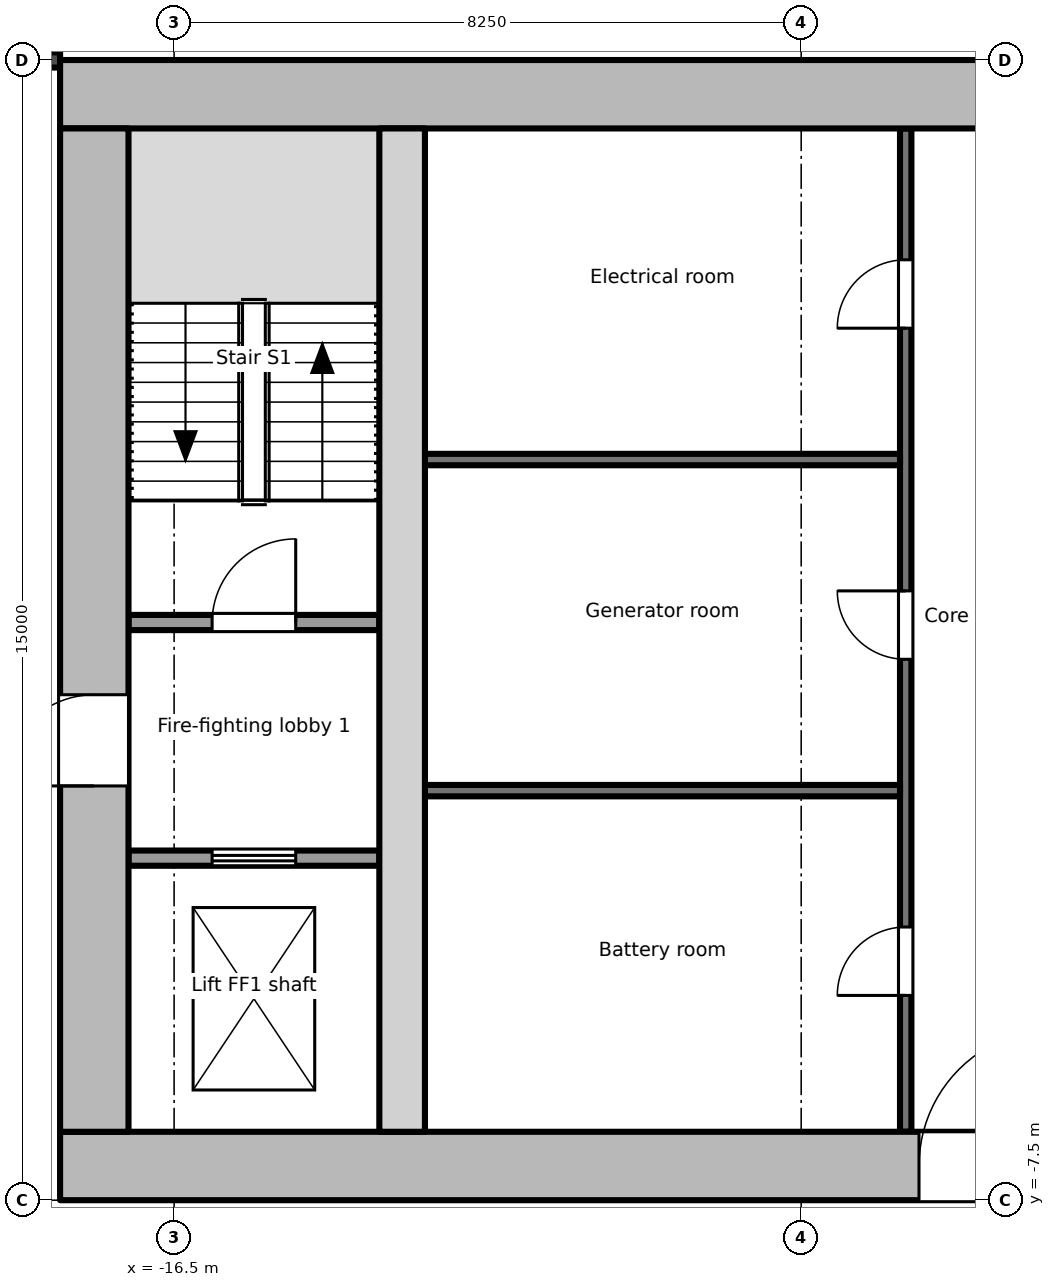
"""IFC4 building model, lengths in metres.
Left out: names, types, materials, properties, quantities, classifications, styles, units other than length and angle.
Written with IfcOpenShell. Run it as: python <this file> out.ifc"""

import sys

from ifc_helpers import new_model, si_unit, direction, frame, frame_2d, origin, place, context, subcontext, project, spatial, rectangle, extrude, element, fill, save


model = new_model("IFC4")
c1 = context("Model", 3, precision=1e-05, world=origin(), true_north=direction((0.0, 1.0)))
c2 = subcontext(c1, "Body", "Model", "MODEL_VIEW")
j1 = project(units=[si_unit("LENGTHUNIT", "METRE"), si_unit("PLANEANGLEUNIT", "RADIAN")], contexts=[c1])
p1 = place(None, origin())
s1 = spatial("IfcSite", under=j1, at=p1, CompositionType="ELEMENT")
p2 = place(p1, origin())
s2 = spatial("IfcBuilding", under=s1, at=p2, CompositionType="ELEMENT")
p3 = place(p2, frame((0.0, 0.0, 296.3)))
s3 = spatial("IfcBuildingStorey", under=s2, at=p3, CompositionType="ELEMENT", Elevation=296.3)
p4 = place(p3, frame((-18.0, -7.05, -0.2), z_axis=(0.0, 0.0, 1.0), x_axis=(1.0, 0.0, 0.0)))
e1 = element("IfcWall", 1, at=p4, inside=s3, PredefinedType="SHEAR", context=c2, shape_type="SweptSolid", body=[
    extrude(rectangle(XDim=36.0, YDim=0.9, at=frame_2d((18.0, 0.0))), origin(), (0.0, 0.0, 1.0), 4.0),
])
p5 = place(p4, frame((11.3, 0.0, 0.2)))
e2 = element("IfcOpeningElement", 2, at=p5, cuts=e1, PredefinedType="OPENING", context=c2, shape_type="SweptSolid", body=[
    extrude(rectangle(XDim=1.8, YDim=2.1, at=frame_2d((0.9, 1.05))), frame((0.0, 0.46, 0.0), z_axis=(0.0, -1.0, 0.0), x_axis=(1.0, 0.0, 0.0)), (0.0, 0.0, 1.0), 0.921),
])
p6 = place(p4, frame((20.3, 0.0, 0.2)))
e3 = element("IfcOpeningElement", 3, at=p6, cuts=e1, PredefinedType="OPENING", context=c2, shape_type="SweptSolid", body=[
    extrude(rectangle(XDim=1.8, YDim=2.1, at=frame_2d((0.9, 1.05))), frame((0.0, 0.46, 0.0), z_axis=(0.0, -1.0, 0.0), x_axis=(1.0, 0.0, 0.0)), (0.0, 0.0, 1.0), 0.921),
])
p7 = place(p4, frame((29.3, 0.0, 0.2)))
e4 = element("IfcOpeningElement", 4, at=p7, cuts=e1, PredefinedType="OPENING", context=c2, shape_type="SweptSolid", body=[
    extrude(rectangle(XDim=1.8, YDim=2.1, at=frame_2d((0.9, 1.05))), frame((0.0, 0.46, 0.0), z_axis=(0.0, -1.0, 0.0), x_axis=(1.0, 0.0, 0.0)), (0.0, 0.0, 1.0), 0.921),
])
p8 = place(p3, frame((-18.0, 7.05, -0.2), z_axis=(0.0, 0.0, 1.0), x_axis=(1.0, 0.0, 0.0)))
e5 = element("IfcWall", 5, at=p8, inside=s3, PredefinedType="SHEAR", context=c2, shape_type="SweptSolid", body=[
    extrude(rectangle(XDim=36.0, YDim=0.9, at=frame_2d((18.0, 0.0))), origin(), (0.0, 0.0, 1.0), 4.0),
])
p9 = place(p3, frame((-17.55, -6.6, -0.2), z_axis=(0.0, 0.0, 1.0), x_axis=(0.0, 1.0, 0.0)))
e6 = element("IfcWall", 6, at=p9, inside=s3, PredefinedType="SHEAR", context=c2, shape_type="SweptSolid", body=[
    extrude(rectangle(XDim=13.2, YDim=0.9, at=frame_2d((6.6, 0.0))), origin(), (0.0, 0.0, 1.0), 4.0),
])
p10 = place(p9, frame((4.55, 0.0, 0.2)))
e7 = element("IfcOpeningElement", 7, at=p10, cuts=e6, PredefinedType="OPENING", context=c2, shape_type="SweptSolid", body=[
    extrude(rectangle(XDim=1.2, YDim=2.1, at=frame_2d((0.6, 1.05))), frame((0.0, 0.46, 0.0), z_axis=(0.0, -1.0, 0.0), x_axis=(1.0, 0.0, 0.0)), (0.0, 0.0, 1.0), 0.921),
])
p11 = place(p3, frame((-13.5, -6.6, -0.2), z_axis=(0.0, 0.0, 1.0), x_axis=(0.0, 1.0, 0.0)))
e8 = element("IfcWall", 8, at=p11, inside=s3, PredefinedType="SHEAR", context=c2, shape_type="SweptSolid", body=[
    extrude(rectangle(XDim=13.2, YDim=0.6, at=frame_2d((6.6, 0.0))), origin(), (0.0, 0.0, 1.0), 4.0),
])
p12 = place(p3, frame((-17.1, -3.0, 0.0), z_axis=(0.0, 0.0, 1.0), x_axis=(1.0, 0.0, 0.0)))
e9 = element("IfcWall", 9, at=p12, inside=s3, PredefinedType="PARTITIONING", context=c2, shape_type="SweptSolid", body=[
    extrude(rectangle(XDim=3.3, YDim=0.2, at=frame_2d((1.65, 0.0))), origin(), (0.0, 0.0, 1.0), 3.8),
])
p13 = place(p12, frame((1.1, 0.0, 0.0)))
e10 = element("IfcOpeningElement", 10, at=p13, cuts=e9, PredefinedType="OPENING", context=c2, shape_type="SweptSolid", body=[
    extrude(rectangle(XDim=1.1, YDim=2.1, at=frame_2d((0.55, 1.05))), frame((0.0, 0.111, 0.0), z_axis=(0.0, -1.0, 0.0), x_axis=(1.0, 0.0, 0.0)), (0.0, 0.0, 1.0), 0.221),
])
p14 = place(p3, frame((-17.1, 0.1, 0.0), z_axis=(0.0, 0.0, 1.0), x_axis=(1.0, 0.0, 0.0)))
e11 = element("IfcWall", 11, at=p14, inside=s3, PredefinedType="PARTITIONING", context=c2, shape_type="SweptSolid", body=[
    extrude(rectangle(XDim=3.3, YDim=0.2, at=frame_2d((1.65, 0.0))), origin(), (0.0, 0.0, 1.0), 3.8),
])
p15 = place(p14, frame((1.1, 0.0, 0.0)))
e12 = element("IfcOpeningElement", 12, at=p15, cuts=e11, PredefinedType="OPENING", context=c2, shape_type="SweptSolid", body=[
    extrude(rectangle(XDim=1.1, YDim=2.1, at=frame_2d((0.55, 1.05))), frame((0.0, 0.111, 0.0), z_axis=(0.0, -1.0, 0.0), x_axis=(1.0, 0.0, 0.0)), (0.0, 0.0, 1.0), 0.221),
])
p16 = place(p3, frame((-6.875, -6.6, 0.0), z_axis=(0.0, 0.0, 1.0), x_axis=(0.0, 1.0, 0.0)))
e13 = element("IfcWall", 13, at=p16, inside=s3, PredefinedType="PARTITIONING", context=c2, shape_type="SweptSolid", body=[
    extrude(rectangle(XDim=13.2, YDim=0.15, at=frame_2d((6.6, 0.0))), origin(), (0.0, 0.0, 1.0), 3.8),
])
p17 = place(p16, frame((1.794, 0.0, 0.0)))
e14 = element("IfcOpeningElement", 14, at=p17, cuts=e13, PredefinedType="OPENING", context=c2, shape_type="SweptSolid", body=[
    extrude(rectangle(XDim=0.9, YDim=2.1, at=frame_2d((0.45, 1.05))), frame((0.0, 0.085, 0.0), z_axis=(0.0, -1.0, 0.0), x_axis=(1.0, 0.0, 0.0)), (0.0, 0.0, 1.0), 0.171),
])
p18 = place(p16, frame((6.216, 0.0, 0.0)))
e15 = element("IfcOpeningElement", 15, at=p18, cuts=e13, PredefinedType="OPENING", context=c2, shape_type="SweptSolid", body=[
    extrude(rectangle(XDim=0.9, YDim=2.1, at=frame_2d((0.45, 1.05))), frame((0.0, 0.085, 0.0), z_axis=(0.0, -1.0, 0.0), x_axis=(1.0, 0.0, 0.0)), (0.0, 0.0, 1.0), 0.171),
])
p19 = place(p16, frame((10.572, 0.0, 0.0)))
e16 = element("IfcOpeningElement", 16, at=p19, cuts=e13, PredefinedType="OPENING", context=c2, shape_type="SweptSolid", body=[
    extrude(rectangle(XDim=0.9, YDim=2.1, at=frame_2d((0.45, 1.05))), frame((0.0, 0.085, 0.0), z_axis=(0.0, -1.0, 0.0), x_axis=(1.0, 0.0, 0.0)), (0.0, 0.0, 1.0), 0.171),
])
for number, where, z_axis, x_axis in (
    (17, (-13.2, -2.112, 0.0), (0.0, 0.0, 1.0), (1.0, 0.0, 0.0)),
    (18, (-13.2, 2.244, 0.0), (0.0, 0.0, 1.0), (1.0, 0.0, 0.0)),
):
    element("IfcWall", number, at=place(p3, frame(where, z_axis=z_axis, x_axis=x_axis)), inside=s3, PredefinedType="PARTITIONING", context=c2, shape_type="SweptSolid", body=[
        extrude(rectangle(XDim=6.25, YDim=0.15, at=frame_2d((3.125, 0.0))), origin(), (0.0, 0.0, 1.0), 3.8),
    ])
p20 = place(p3, frame((-20.6, 7.501, 0.0), z_axis=(0.0, 0.0, 1.0), x_axis=(1.0, 0.0, 0.0)))
e19 = element("IfcWall", 19, at=p20, inside=s3, PredefinedType="PARTITIONING", context=c2, shape_type="SweptSolid", body=[
    extrude(rectangle(XDim=2.6, YDim=0.2, at=frame_2d((1.3, 0.0))), origin(), (0.0, 0.0, 1.0), 3.8),
])
p21 = place(p13, origin())
e20 = element("IfcDoor", 20, at=p21, inside=s3, OperationType="DOUBLE_DOOR_SLIDING", PredefinedType="DOOR", context=c2, shape_type="SweptSolid", body=[
    extrude(rectangle(XDim=1.1, YDim=2.1, at=frame_2d((0.55, 1.05))), frame((0.0, 0.025, 0.0), z_axis=(0.0, -1.0, 0.0), x_axis=(1.0, 0.0, 0.0)), (0.0, 0.0, 1.0), 0.05),
])
fill(e10, e20)
p22 = place(p10, origin())
e21 = element("IfcDoor", 21, at=p22, inside=s3, OperationType="SINGLE_SWING_LEFT", PredefinedType="DOOR", context=c2, shape_type="SweptSolid", body=[
    extrude(rectangle(XDim=1.2, YDim=2.1, at=frame_2d((0.6, 1.05))), frame((0.0, 0.025, 0.0), z_axis=(0.0, -1.0, 0.0), x_axis=(1.0, 0.0, 0.0)), (0.0, 0.0, 1.0), 0.05),
])
fill(e7, e21)
p23 = place(p15, origin())
e22 = element("IfcDoor", 22, at=p23, inside=s3, OperationType="SINGLE_SWING_RIGHT", PredefinedType="DOOR", context=c2, shape_type="SweptSolid", body=[
    extrude(rectangle(XDim=1.1, YDim=2.1, at=frame_2d((0.55, 1.05))), frame((0.0, 0.025, 0.0), z_axis=(0.0, -1.0, 0.0), x_axis=(1.0, 0.0, 0.0)), (0.0, 0.0, 1.0), 0.05),
])
fill(e12, e22)
p24 = place(p17, origin())
e23 = element("IfcDoor", 23, at=p24, inside=s3, OperationType="SINGLE_SWING_LEFT", PredefinedType="DOOR", context=c2, shape_type="SweptSolid", body=[
    extrude(rectangle(XDim=0.9, YDim=2.1, at=frame_2d((0.45, 1.05))), frame((0.0, 0.025, 0.0), z_axis=(0.0, -1.0, 0.0), x_axis=(1.0, 0.0, 0.0)), (0.0, 0.0, 1.0), 0.05),
])
fill(e14, e23)
p25 = place(p18, origin())
e24 = element("IfcDoor", 24, at=p25, inside=s3, OperationType="SINGLE_SWING_RIGHT", PredefinedType="DOOR", context=c2, shape_type="SweptSolid", body=[
    extrude(rectangle(XDim=0.9, YDim=2.1, at=frame_2d((0.45, 1.05))), frame((0.0, 0.025, 0.0), z_axis=(0.0, -1.0, 0.0), x_axis=(1.0, 0.0, 0.0)), (0.0, 0.0, 1.0), 0.05),
])
fill(e15, e24)
p26 = place(p19, origin())
e25 = element("IfcDoor", 25, at=p26, inside=s3, OperationType="SINGLE_SWING_LEFT", PredefinedType="DOOR", context=c2, shape_type="SweptSolid", body=[
    extrude(rectangle(XDim=0.9, YDim=2.1, at=frame_2d((0.45, 1.05))), frame((0.0, 0.025, 0.0), z_axis=(0.0, -1.0, 0.0), x_axis=(1.0, 0.0, 0.0)), (0.0, 0.0, 1.0), 0.05),
])
fill(e16, e25)
p27 = place(p5, origin())
e26 = element("IfcDoor", 26, at=p27, inside=s3, OperationType="SINGLE_SWING_RIGHT", PredefinedType="DOOR", context=c2, shape_type="SweptSolid", body=[
    extrude(rectangle(XDim=1.8, YDim=2.1, at=frame_2d((0.9, 1.05))), frame((0.0, 0.025, 0.0), z_axis=(0.0, -1.0, 0.0), x_axis=(1.0, 0.0, 0.0)), (0.0, 0.0, 1.0), 0.05),
])
fill(e2, e26)
save(model, sys.argv[1])
